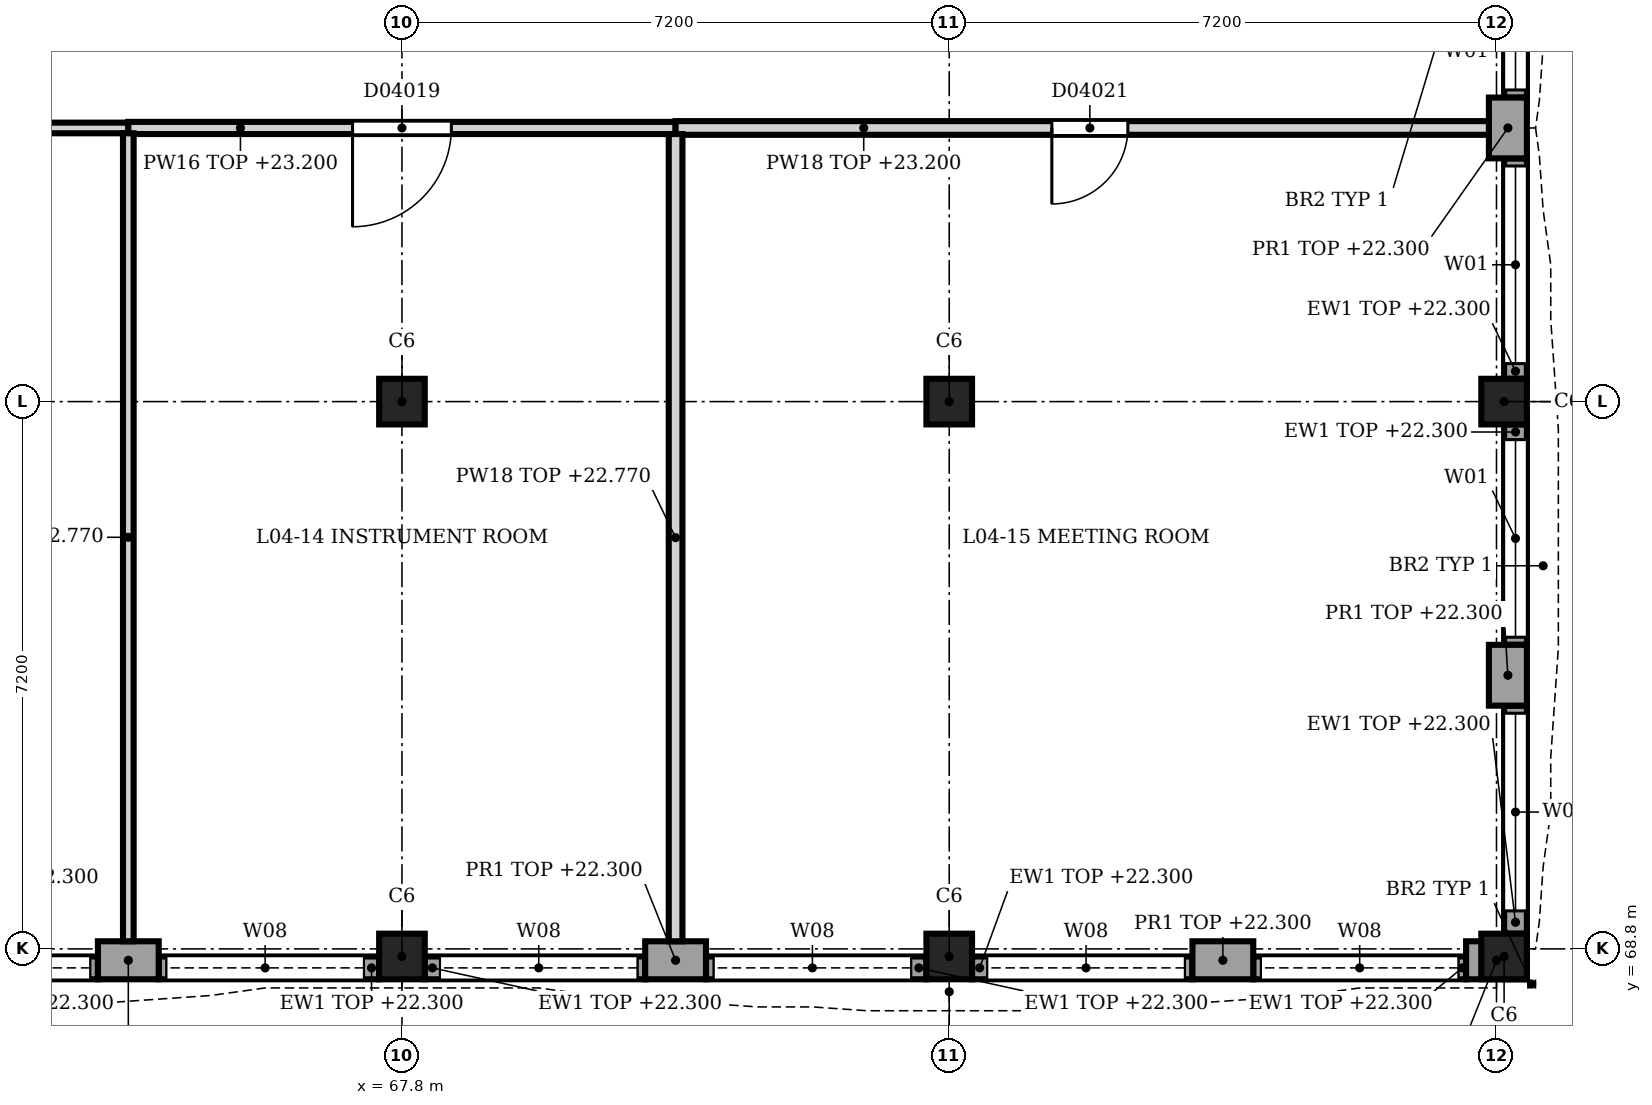
"""IFC4 building model, lengths in metres.
Left out: names, types, materials, properties, quantities, classifications, styles, units other than length and angle.
Written with IfcOpenShell. Run it as: python <this file> out.ifc"""

import sys

from ifc_helpers import new_model, si_unit, direction, frame, frame_2d, origin, origin_2d, place, context, subcontext, project, spatial, rectangle, extrude, element, fill, save


model = new_model("IFC4")
c1 = context("Model", 3, precision=1e-05, world=origin(), true_north=direction((0.0, 1.0)))
c2 = subcontext(c1, "Body", "Model", "MODEL_VIEW")
j1 = project(units=[si_unit("LENGTHUNIT", "METRE"), si_unit("PLANEANGLEUNIT", "RADIAN")], contexts=[c1])
p1 = place(None, origin())
s1 = spatial("IfcSite", under=j1, at=p1, CompositionType="ELEMENT")
p2 = place(p1, origin())
s2 = spatial("IfcBuilding", under=s1, at=p2, CompositionType="ELEMENT")
p3 = place(p2, frame((0.0, 0.0, 18.9)))
s3 = spatial("IfcBuildingStorey", under=s2, at=p3, CompositionType="ELEMENT", Elevation=18.9)
for number, where, z_axis, x_axis in (
    (1, (67.8, 68.7, 0.0), (0.0, 0.0, 1.0), (1.0, 0.0, 0.0)),
    (2, (67.8, 76.0, 0.0), (0.0, 0.0, 1.0), (1.0, 0.0, 0.0)),
    (3, (75.0, 68.7, 0.0), (0.0, 0.0, 1.0), (1.0, 0.0, 0.0)),
    (4, (75.0, 76.0, 0.0), (0.0, 0.0, 1.0), (1.0, 0.0, 0.0)),
    (5, (82.3, 68.7, 0.0), (0.0, 0.0, 1.0), (1.0, 0.0, 0.0)),
    (6, (82.3, 76.0, 0.0), (0.0, 0.0, 1.0), (1.0, 0.0, 0.0)),
):
    element("IfcColumn", number, at=place(p3, frame(where, z_axis=z_axis, x_axis=x_axis)), inside=s3, PredefinedType="COLUMN", context=c2, shape_type="SweptSolid", body=[
        extrude(rectangle(XDim=0.6, YDim=0.6, at=origin_2d()), origin(), (0.0, 0.0, 1.0), 4.5),
    ])
for number, where, z_axis, x_axis in (
    (7, (82.35, 80.0, 0.0), (0.0, 0.0, 1.0), (0.0, -1.0, 0.0)),
    (8, (82.35, 72.8, 0.0), (0.0, 0.0, 1.0), (0.0, -1.0, 0.0)),
):
    element("IfcWall", number, at=place(p3, frame(where, z_axis=z_axis, x_axis=x_axis)), inside=s3, PredefinedType="SOLIDWALL", context=c2, shape_type="SweptSolid", body=[
        extrude(rectangle(XDim=0.8, YDim=0.5, at=frame_2d((0.4, 0.0))), origin(), (0.0, 0.0, 1.0), 3.4),
    ])
p4 = place(p3, frame((82.45, 82.9, 0.0), z_axis=(0.0, 0.0, 1.0), x_axis=(0.0, -1.0, 0.0)))
e9 = element("IfcWall", 9, at=p4, inside=s3, PredefinedType="SOLIDWALL", context=c2, shape_type="SweptSolid", body=[
    extrude(rectangle(XDim=2.9, YDim=0.3, at=frame_2d((1.45, 0.0))), origin(), (0.0, 0.0, 1.0), 3.4),
])
p5 = place(p4, frame((0.2, 0.0, 0.9)))
e10 = element("IfcOpeningElement", 10, at=p5, cuts=e9, PredefinedType="OPENING", context=c2, shape_type="SweptSolid", body=[
    extrude(rectangle(XDim=2.6, YDim=2.4, at=frame_2d((1.3, 1.2))), frame((0.0, 0.16, 0.0), z_axis=(0.0, -1.0, 0.0), x_axis=(1.0, 0.0, 0.0)), (0.0, 0.0, 1.0), 0.32),
])
p6 = place(p3, frame((82.45, 79.2, 0.0), z_axis=(0.0, 0.0, 1.0), x_axis=(0.0, -1.0, 0.0)))
e11 = element("IfcWall", 11, at=p6, inside=s3, PredefinedType="SOLIDWALL", context=c2, shape_type="SweptSolid", body=[
    extrude(rectangle(XDim=2.9, YDim=0.3, at=frame_2d((1.45, 0.0))), origin(), (0.0, 0.0, 1.0), 3.4),
])
p7 = place(p6, frame((0.1, 0.0, 0.9)))
e12 = element("IfcOpeningElement", 12, at=p7, cuts=e11, PredefinedType="OPENING", context=c2, shape_type="SweptSolid", body=[
    extrude(rectangle(XDim=2.6, YDim=2.4, at=frame_2d((1.3, 1.2))), frame((0.0, 0.16, 0.0), z_axis=(0.0, -1.0, 0.0), x_axis=(1.0, 0.0, 0.0)), (0.0, 0.0, 1.0), 0.32),
])
p8 = place(p3, frame((82.45, 75.7, 0.0), z_axis=(0.0, 0.0, 1.0), x_axis=(0.0, -1.0, 0.0)))
e13 = element("IfcWall", 13, at=p8, inside=s3, PredefinedType="SOLIDWALL", context=c2, shape_type="SweptSolid", body=[
    extrude(rectangle(XDim=2.9, YDim=0.3, at=frame_2d((1.45, 0.0))), origin(), (0.0, 0.0, 1.0), 3.4),
])
p9 = place(p8, frame((0.2, 0.0, 0.9)))
e14 = element("IfcOpeningElement", 14, at=p9, cuts=e13, PredefinedType="OPENING", context=c2, shape_type="SweptSolid", body=[
    extrude(rectangle(XDim=2.6, YDim=2.4, at=frame_2d((1.3, 1.2))), frame((0.0, 0.16, 0.0), z_axis=(0.0, -1.0, 0.0), x_axis=(1.0, 0.0, 0.0)), (0.0, 0.0, 1.0), 0.32),
])
p10 = place(p3, frame((82.45, 72.0, 0.0), z_axis=(0.0, 0.0, 1.0), x_axis=(0.0, -1.0, 0.0)))
e15 = element("IfcWall", 15, at=p10, inside=s3, PredefinedType="SOLIDWALL", context=c2, shape_type="SweptSolid", body=[
    extrude(rectangle(XDim=3.0, YDim=0.3, at=frame_2d((1.5, 0.0))), origin(), (0.0, 0.0, 1.0), 3.4),
])
p11 = place(p10, frame((0.1, 0.0, 0.9)))
e16 = element("IfcOpeningElement", 16, at=p11, cuts=e15, PredefinedType="OPENING", context=c2, shape_type="SweptSolid", body=[
    extrude(rectangle(XDim=2.6, YDim=2.4, at=frame_2d((1.3, 1.2))), frame((0.0, 0.16, 0.0), z_axis=(0.0, -1.0, 0.0), x_axis=(1.0, 0.0, 0.0)), (0.0, 0.0, 1.0), 0.32),
])
for number, where, z_axis, x_axis in (
    (17, (82.6, 68.65, 0.0), (0.0, 0.0, 1.0), (-1.0, 0.0, 0.0)),
    (18, (79.0, 68.65, 0.0), (0.0, 0.0, 1.0), (-1.0, 0.0, 0.0)),
    (19, (71.8, 68.65, 0.0), (0.0, 0.0, 1.0), (-1.0, 0.0, 0.0)),
    (20, (64.6, 68.65, 0.0), (0.0, 0.0, 1.0), (-1.0, 0.0, 0.0)),
):
    element("IfcWall", number, at=place(p3, frame(where, z_axis=z_axis, x_axis=x_axis)), inside=s3, PredefinedType="SOLIDWALL", context=c2, shape_type="SweptSolid", body=[
        extrude(rectangle(XDim=0.8, YDim=0.5, at=frame_2d((0.4, 0.0))), origin(), (0.0, 0.0, 1.0), 3.4),
    ])
p12 = place(p3, frame((81.8, 68.55, 0.0), z_axis=(0.0, 0.0, 1.0), x_axis=(-1.0, 0.0, 0.0)))
e21 = element("IfcWall", 21, at=p12, inside=s3, PredefinedType="SOLIDWALL", context=c2, shape_type="SweptSolid", body=[
    extrude(rectangle(XDim=2.8, YDim=0.3, at=frame_2d((1.4, 0.0))), origin(), (0.0, 0.0, 1.0), 3.4),
])
p13 = place(p12, frame((0.1, 0.0, 1.2)))
e22 = element("IfcOpeningElement", 22, at=p13, cuts=e21, PredefinedType="OPENING", context=c2, shape_type="SweptSolid", body=[
    extrude(rectangle(XDim=2.6, YDim=2.1, at=frame_2d((1.3, 1.05))), frame((0.0, 0.16, 0.0), z_axis=(0.0, -1.0, 0.0), x_axis=(1.0, 0.0, 0.0)), (0.0, 0.0, 1.0), 0.32),
])
p14 = place(p3, frame((78.2, 68.55, 0.0), z_axis=(0.0, 0.0, 1.0), x_axis=(-1.0, 0.0, 0.0)))
e23 = element("IfcWall", 23, at=p14, inside=s3, PredefinedType="SOLIDWALL", context=c2, shape_type="SweptSolid", body=[
    extrude(rectangle(XDim=2.9, YDim=0.3, at=frame_2d((1.45, 0.0))), origin(), (0.0, 0.0, 1.0), 3.4),
])
p15 = place(p14, frame((0.1, 0.0, 1.2)))
e24 = element("IfcOpeningElement", 24, at=p15, cuts=e23, PredefinedType="OPENING", context=c2, shape_type="SweptSolid", body=[
    extrude(rectangle(XDim=2.6, YDim=2.1, at=frame_2d((1.3, 1.05))), frame((0.0, 0.16, 0.0), z_axis=(0.0, -1.0, 0.0), x_axis=(1.0, 0.0, 0.0)), (0.0, 0.0, 1.0), 0.32),
])
p16 = place(p3, frame((74.7, 68.55, 0.0), z_axis=(0.0, 0.0, 1.0), x_axis=(-1.0, 0.0, 0.0)))
e25 = element("IfcWall", 25, at=p16, inside=s3, PredefinedType="SOLIDWALL", context=c2, shape_type="SweptSolid", body=[
    extrude(rectangle(XDim=2.9, YDim=0.3, at=frame_2d((1.45, 0.0))), origin(), (0.0, 0.0, 1.0), 3.4),
])
p17 = place(p16, frame((0.2, 0.0, 1.2)))
e26 = element("IfcOpeningElement", 26, at=p17, cuts=e25, PredefinedType="OPENING", context=c2, shape_type="SweptSolid", body=[
    extrude(rectangle(XDim=2.6, YDim=2.1, at=frame_2d((1.3, 1.05))), frame((0.0, 0.16, 0.0), z_axis=(0.0, -1.0, 0.0), x_axis=(1.0, 0.0, 0.0)), (0.0, 0.0, 1.0), 0.32),
])
p18 = place(p3, frame((71.0, 68.55, 0.0), z_axis=(0.0, 0.0, 1.0), x_axis=(-1.0, 0.0, 0.0)))
e27 = element("IfcWall", 27, at=p18, inside=s3, PredefinedType="SOLIDWALL", context=c2, shape_type="SweptSolid", body=[
    extrude(rectangle(XDim=2.9, YDim=0.3, at=frame_2d((1.45, 0.0))), origin(), (0.0, 0.0, 1.0), 3.4),
])
p19 = place(p18, frame((0.1, 0.0, 1.2)))
e28 = element("IfcOpeningElement", 28, at=p19, cuts=e27, PredefinedType="OPENING", context=c2, shape_type="SweptSolid", body=[
    extrude(rectangle(XDim=2.6, YDim=2.1, at=frame_2d((1.3, 1.05))), frame((0.0, 0.16, 0.0), z_axis=(0.0, -1.0, 0.0), x_axis=(1.0, 0.0, 0.0)), (0.0, 0.0, 1.0), 0.32),
])
p20 = place(p3, frame((67.5, 68.55, 0.0), z_axis=(0.0, 0.0, 1.0), x_axis=(-1.0, 0.0, 0.0)))
e29 = element("IfcWall", 29, at=p20, inside=s3, PredefinedType="SOLIDWALL", context=c2, shape_type="SweptSolid", body=[
    extrude(rectangle(XDim=2.9, YDim=0.3, at=frame_2d((1.45, 0.0))), origin(), (0.0, 0.0, 1.0), 3.4),
])
p21 = place(p20, frame((0.2, 0.0, 1.2)))
e30 = element("IfcOpeningElement", 30, at=p21, cuts=e29, PredefinedType="OPENING", context=c2, shape_type="SweptSolid", body=[
    extrude(rectangle(XDim=2.6, YDim=2.1, at=frame_2d((1.3, 1.05))), frame((0.0, 0.16, 0.0), z_axis=(0.0, -1.0, 0.0), x_axis=(1.0, 0.0, 0.0)), (0.0, 0.0, 1.0), 0.32),
])
p22 = place(p3, frame((63.8, 68.55, 0.0), z_axis=(0.0, 0.0, 1.0), x_axis=(-1.0, 0.0, 0.0)))
e31 = element("IfcWall", 31, at=p22, inside=s3, PredefinedType="SOLIDWALL", context=c2, shape_type="SweptSolid", body=[
    extrude(rectangle(XDim=2.9, YDim=0.3, at=frame_2d((1.45, 0.0))), origin(), (0.0, 0.0, 1.0), 3.4),
])
p23 = place(p22, frame((0.1, 0.0, 1.2)))
e32 = element("IfcOpeningElement", 32, at=p23, cuts=e31, PredefinedType="OPENING", context=c2, shape_type="SweptSolid", body=[
    extrude(rectangle(XDim=2.6, YDim=2.1, at=frame_2d((1.3, 1.05))), frame((0.0, 0.16, 0.0), z_axis=(0.0, -1.0, 0.0), x_axis=(1.0, 0.0, 0.0)), (0.0, 0.0, 1.0), 0.32),
])
p24 = place(p3, frame((64.2, 79.6, 0.0), z_axis=(0.0, 0.0, 1.0), x_axis=(-1.0, 0.0, 0.0)))
e33 = element("IfcWall", 33, at=p24, inside=s3, PredefinedType="PARTITIONING", context=c2, shape_type="SweptSolid", body=[
    extrude(rectangle(XDim=14.4, YDim=0.14, at=frame_2d((7.2, 0.0))), origin(), (0.0, 0.0, 1.0), 4.3),
])
p25 = place(p24, frame((6.65, 0.0, 0.0)))
e34 = element("IfcOpeningElement", 34, at=p25, cuts=e33, PredefinedType="OPENING", context=c2, shape_type="SweptSolid", body=[
    extrude(rectangle(XDim=1.2, YDim=2.1, at=frame_2d((0.6, 1.05))), frame((0.0, 0.08, 0.0), z_axis=(0.0, -1.0, 0.0), x_axis=(1.0, 0.0, 0.0)), (0.0, 0.0, 1.0), 0.16),
])
p26 = place(p3, frame((71.4, 79.6, 0.0), z_axis=(0.0, 0.0, 1.0), x_axis=(-1.0, 0.0, 0.0)))
e35 = element("IfcWall", 35, at=p26, inside=s3, PredefinedType="PARTITIONING", context=c2, shape_type="SweptSolid", body=[
    extrude(rectangle(XDim=7.2, YDim=0.16, at=frame_2d((3.6, 0.0))), origin(), (0.0, 0.0, 1.0), 4.3),
])
p27 = place(p26, frame((2.95, 0.0, 0.0)))
e36 = element("IfcOpeningElement", 36, at=p27, cuts=e35, PredefinedType="OPENING", context=c2, shape_type="SweptSolid", body=[
    extrude(rectangle(XDim=1.3, YDim=2.2, at=frame_2d((0.65, 1.1))), frame((0.0, 0.09, 0.0), z_axis=(0.0, -1.0, 0.0), x_axis=(1.0, 0.0, 0.0)), (0.0, 0.0, 1.0), 0.18),
])
p28 = place(p3, frame((82.1, 79.6, 0.0), z_axis=(0.0, 0.0, 1.0), x_axis=(-1.0, 0.0, 0.0)))
e37 = element("IfcWall", 37, at=p28, inside=s3, PredefinedType="PARTITIONING", context=c2, shape_type="SweptSolid", body=[
    extrude(rectangle(XDim=10.7, YDim=0.18, at=frame_2d((5.35, 0.0))), origin(), (0.0, 0.0, 1.0), 4.3),
])
p29 = place(p28, frame((4.75, 0.0, 0.0)))
e38 = element("IfcOpeningElement", 38, at=p29, cuts=e37, PredefinedType="OPENING", context=c2, shape_type="SweptSolid", body=[
    extrude(rectangle(XDim=1.0, YDim=2.1, at=frame_2d((0.5, 1.05))), frame((0.0, 0.1, 0.0), z_axis=(0.0, -1.0, 0.0), x_axis=(1.0, 0.0, 0.0)), (0.0, 0.0, 1.0), 0.2),
])
p30 = place(p3, frame((64.2, 68.9, 0.0), z_axis=(0.0, 0.0, 1.0), x_axis=(0.0, 1.0, 0.0)))
e39 = element("IfcWall", 39, at=p30, inside=s3, PredefinedType="PARTITIONING", context=c2, shape_type="SweptSolid", body=[
    extrude(rectangle(XDim=10.63, YDim=0.14, at=frame_2d((5.315, 0.0))), origin(), (0.0, 0.0, 1.0), 3.87),
])
p31 = place(p3, frame((71.4, 68.9, 0.0), z_axis=(0.0, 0.0, 1.0), x_axis=(0.0, 1.0, 0.0)))
e40 = element("IfcWall", 40, at=p31, inside=s3, PredefinedType="PARTITIONING", context=c2, shape_type="SweptSolid", body=[
    extrude(rectangle(XDim=10.62, YDim=0.18, at=frame_2d((5.31, 0.0))), origin(), (0.0, 0.0, 1.0), 3.87),
])
p32 = place(p5, origin())
e41 = element("IfcWindow", 41, at=p32, inside=s3, PartitioningType="SINGLE_PANEL", PredefinedType="WINDOW", context=c2, shape_type="SweptSolid", body=[
    extrude(rectangle(XDim=2.6, YDim=2.4, at=frame_2d((1.3, 1.2))), frame((0.0, 0.03, 0.0), z_axis=(0.0, -1.0, 0.0), x_axis=(1.0, 0.0, 0.0)), (0.0, 0.0, 1.0), 0.06),
])
fill(e10, e41)
p33 = place(p7, origin())
e42 = element("IfcWindow", 42, at=p33, inside=s3, PartitioningType="SINGLE_PANEL", PredefinedType="WINDOW", context=c2, shape_type="SweptSolid", body=[
    extrude(rectangle(XDim=2.6, YDim=2.4, at=frame_2d((1.3, 1.2))), frame((0.0, 0.03, 0.0), z_axis=(0.0, -1.0, 0.0), x_axis=(1.0, 0.0, 0.0)), (0.0, 0.0, 1.0), 0.06),
])
fill(e12, e42)
p34 = place(p9, origin())
e43 = element("IfcWindow", 43, at=p34, inside=s3, PartitioningType="SINGLE_PANEL", PredefinedType="WINDOW", context=c2, shape_type="SweptSolid", body=[
    extrude(rectangle(XDim=2.6, YDim=2.4, at=frame_2d((1.3, 1.2))), frame((0.0, 0.03, 0.0), z_axis=(0.0, -1.0, 0.0), x_axis=(1.0, 0.0, 0.0)), (0.0, 0.0, 1.0), 0.06),
])
fill(e14, e43)
p35 = place(p11, origin())
e44 = element("IfcWindow", 44, at=p35, inside=s3, PartitioningType="SINGLE_PANEL", PredefinedType="WINDOW", context=c2, shape_type="SweptSolid", body=[
    extrude(rectangle(XDim=2.6, YDim=2.4, at=frame_2d((1.3, 1.2))), frame((0.0, 0.03, 0.0), z_axis=(0.0, -1.0, 0.0), x_axis=(1.0, 0.0, 0.0)), (0.0, 0.0, 1.0), 0.06),
])
fill(e16, e44)
p36 = place(p13, origin())
e45 = element("IfcWindow", 45, at=p36, inside=s3, PartitioningType="SINGLE_PANEL", PredefinedType="WINDOW", context=c2, shape_type="SweptSolid", body=[
    extrude(rectangle(XDim=2.6, YDim=2.1, at=frame_2d((1.3, 1.05))), frame((0.0, 0.03, 0.0), z_axis=(0.0, -1.0, 0.0), x_axis=(1.0, 0.0, 0.0)), (0.0, 0.0, 1.0), 0.06),
])
fill(e22, e45)
p37 = place(p15, origin())
e46 = element("IfcWindow", 46, at=p37, inside=s3, PartitioningType="SINGLE_PANEL", PredefinedType="WINDOW", context=c2, shape_type="SweptSolid", body=[
    extrude(rectangle(XDim=2.6, YDim=2.1, at=frame_2d((1.3, 1.05))), frame((0.0, 0.03, 0.0), z_axis=(0.0, -1.0, 0.0), x_axis=(1.0, 0.0, 0.0)), (0.0, 0.0, 1.0), 0.06),
])
fill(e24, e46)
p38 = place(p17, origin())
e47 = element("IfcWindow", 47, at=p38, inside=s3, PartitioningType="SINGLE_PANEL", PredefinedType="WINDOW", context=c2, shape_type="SweptSolid", body=[
    extrude(rectangle(XDim=2.6, YDim=2.1, at=frame_2d((1.3, 1.05))), frame((0.0, 0.03, 0.0), z_axis=(0.0, -1.0, 0.0), x_axis=(1.0, 0.0, 0.0)), (0.0, 0.0, 1.0), 0.06),
])
fill(e26, e47)
p39 = place(p19, origin())
e48 = element("IfcWindow", 48, at=p39, inside=s3, PartitioningType="SINGLE_PANEL", PredefinedType="WINDOW", context=c2, shape_type="SweptSolid", body=[
    extrude(rectangle(XDim=2.6, YDim=2.1, at=frame_2d((1.3, 1.05))), frame((0.0, 0.03, 0.0), z_axis=(0.0, -1.0, 0.0), x_axis=(1.0, 0.0, 0.0)), (0.0, 0.0, 1.0), 0.06),
])
fill(e28, e48)
p40 = place(p21, origin())
e49 = element("IfcWindow", 49, at=p40, inside=s3, PartitioningType="SINGLE_PANEL", PredefinedType="WINDOW", context=c2, shape_type="SweptSolid", body=[
    extrude(rectangle(XDim=2.6, YDim=2.1, at=frame_2d((1.3, 1.05))), frame((0.0, 0.03, 0.0), z_axis=(0.0, -1.0, 0.0), x_axis=(1.0, 0.0, 0.0)), (0.0, 0.0, 1.0), 0.06),
])
fill(e30, e49)
p41 = place(p23, origin())
e50 = element("IfcWindow", 50, at=p41, inside=s3, PartitioningType="SINGLE_PANEL", PredefinedType="WINDOW", context=c2, shape_type="SweptSolid", body=[
    extrude(rectangle(XDim=2.6, YDim=2.1, at=frame_2d((1.3, 1.05))), frame((0.0, 0.03, 0.0), z_axis=(0.0, -1.0, 0.0), x_axis=(1.0, 0.0, 0.0)), (0.0, 0.0, 1.0), 0.06),
])
fill(e32, e50)
p42 = place(p27, origin())
e51 = element("IfcDoor", 51, at=p42, inside=s3, OperationType="SINGLE_SWING_RIGHT", PredefinedType="DOOR", context=c2, shape_type="SweptSolid", body=[
    extrude(rectangle(XDim=1.3, YDim=2.2, at=frame_2d((0.65, 1.1))), frame((0.0, 0.025, 0.0), z_axis=(0.0, -1.0, 0.0), x_axis=(1.0, 0.0, 0.0)), (0.0, 0.0, 1.0), 0.05),
])
fill(e36, e51)
p43 = place(p29, origin())
e52 = element("IfcDoor", 52, at=p43, inside=s3, OperationType="SINGLE_SWING_LEFT", PredefinedType="DOOR", context=c2, shape_type="SweptSolid", body=[
    extrude(rectangle(XDim=1.0, YDim=2.1, at=frame_2d((0.5, 1.05))), frame((0.0, 0.025, 0.0), z_axis=(0.0, -1.0, 0.0), x_axis=(1.0, 0.0, 0.0)), (0.0, 0.0, 1.0), 0.05),
])
fill(e38, e52)
save(model, sys.argv[1])
